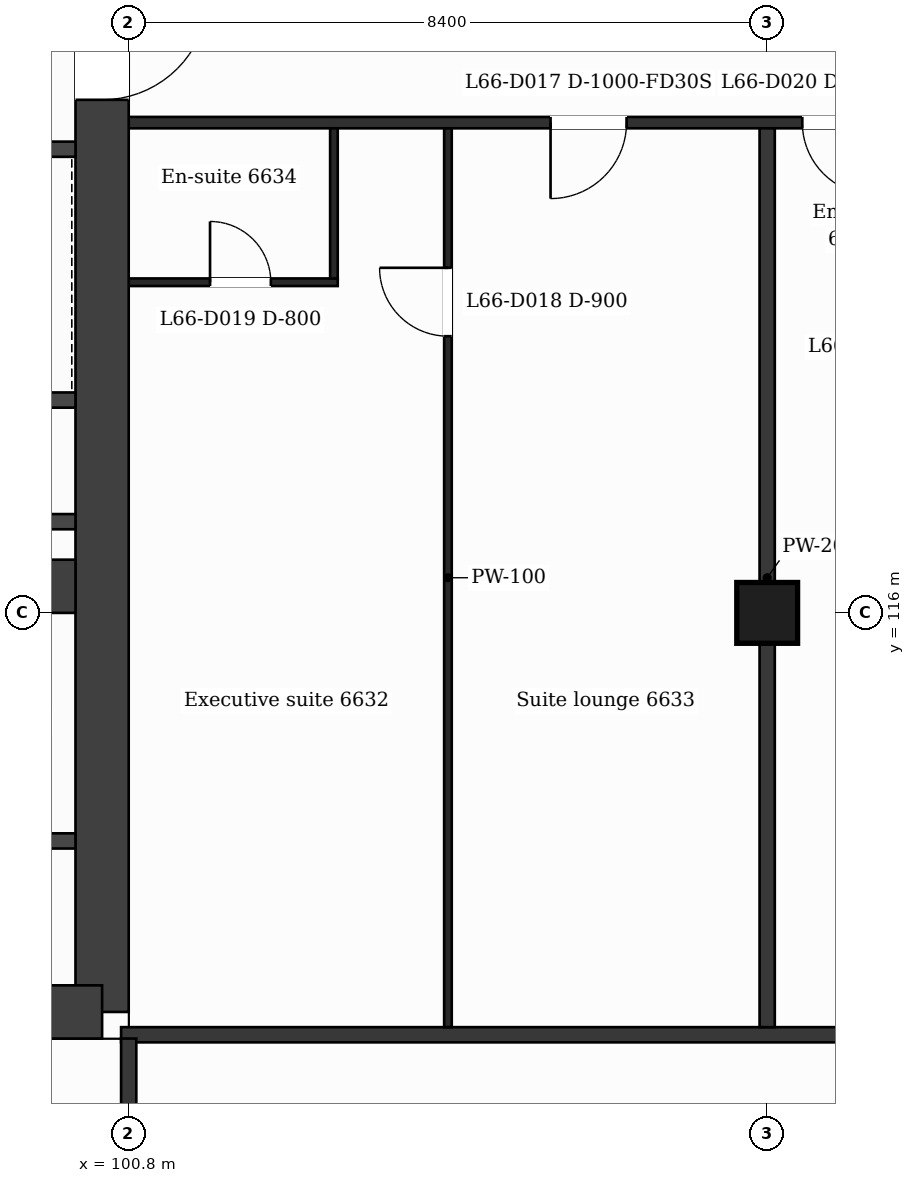
"""IFC4 building model, lengths in metres.
Left out: names, types, materials, properties, quantities, classifications, styles, units other than length and angle.
Written with IfcOpenShell. Run it as: python <this file> out.ifc"""

import sys

from ifc_helpers import new_model, si_unit, direction, frame, frame_2d, origin, origin_2d, place, context, subcontext, project, spatial, rectangle, extrude, element, fill, save


model = new_model("IFC4")
c1 = context("Model", 3, precision=1e-05, world=origin(), true_north=direction((0.0, 1.0)))
c2 = subcontext(c1, "Body", "Model", "MODEL_VIEW")
j1 = project(units=[si_unit("LENGTHUNIT", "METRE"), si_unit("PLANEANGLEUNIT", "RADIAN")], contexts=[c1])
p1 = place(None, origin())
s1 = spatial("IfcSite", under=j1, at=p1, CompositionType="ELEMENT")
p2 = place(p1, origin())
s2 = spatial("IfcBuilding", under=s1, at=p2, CompositionType="ELEMENT")
p3 = place(p2, frame((0.0, 0.0, 273.8)))
s3 = spatial("IfcBuildingStorey", under=s2, at=p3, CompositionType="ELEMENT", Elevation=273.8)
p4 = place(p3, frame((100.45, 132.05, 0.0), z_axis=(0.0, 0.0, 1.0), x_axis=(0.0, -1.0, 0.0)))
e1 = element("IfcWall", 1, at=p4, inside=s3, PredefinedType="SHEAR", context=c2, shape_type="SweptSolid", body=[
    extrude(rectangle(XDim=21.3, YDim=0.7, at=frame_2d((10.65, 0.0))), origin(), (0.0, 0.0, 1.0), 3.7),
])
p5 = place(p4, frame((7.9, 0.0, 0.0)))
e2 = element("IfcOpeningElement", 2, at=p5, cuts=e1, PredefinedType="OPENING", context=c2, shape_type="SweptSolid", body=[
    extrude(rectangle(XDim=1.4, YDim=2.1, at=frame_2d((0.7, 1.05))), frame((0.0, 0.36, 0.0), z_axis=(0.0, -1.0, 0.0), x_axis=(1.0, 0.0, 0.0)), (0.0, 0.0, 1.0), 0.72),
])
p6 = place(p3, frame((100.45, 110.75, 0.0), z_axis=(0.0, 0.0, 1.0), x_axis=(-1.0, 0.0, 0.0)))
e3 = element("IfcWall", 3, at=p6, inside=s3, PredefinedType="SHEAR", context=c2, shape_type="SweptSolid", body=[
    extrude(rectangle(XDim=14.38, YDim=0.7, at=frame_2d((7.19, 0.0))), origin(), (0.0, 0.0, 1.0), 3.7),
])
p7 = place(p6, frame((6.06, 0.0, 0.0)))
e4 = element("IfcOpeningElement", 4, at=p7, cuts=e3, PredefinedType="OPENING", context=c2, shape_type="SweptSolid", body=[
    extrude(rectangle(XDim=1.2, YDim=2.1, at=frame_2d((0.6, 1.05))), frame((0.0, 0.36, 0.0), z_axis=(0.0, -1.0, 0.0), x_axis=(1.0, 0.0, 0.0)), (0.0, 0.0, 1.0), 0.72),
])
p8 = place(p3, frame((94.6, 116.35, 0.0), z_axis=(0.0, 0.0, 1.0), x_axis=(1.0, 0.0, 0.0)))
e5 = element("IfcWall", 5, at=p8, inside=s3, PredefinedType="SHEAR", context=c2, shape_type="SweptSolid", body=[
    extrude(rectangle(XDim=5.5, YDim=0.7, at=frame_2d((2.75, 0.0))), origin(), (0.0, 0.0, 1.0), 3.7),
])
p9 = place(p3, frame((109.2, 116.0, 0.0), z_axis=(0.0, 0.0, 1.0), x_axis=(1.0, 0.0, 0.0)))
e6 = element("IfcColumn", 6, at=p9, inside=s3, PredefinedType="COLUMN", context=c2, shape_type="SweptSolid", body=[
    extrude(rectangle(XDim=0.8, YDim=0.8, at=origin_2d()), origin(), (0.0, 0.0, 1.0), 3.7),
])
p10 = place(p3, frame((100.7, 110.45, 0.0), z_axis=(0.0, 0.0, 1.0), x_axis=(1.0, 0.0, 0.0)))
e7 = element("IfcWall", 7, at=p10, inside=s3, PredefinedType="PARTITIONING", context=c2, shape_type="SweptSolid", body=[
    extrude(rectangle(XDim=25.4, YDim=0.2, at=frame_2d((12.7, 0.0))), origin(), (0.0, 0.0, 1.0), 3.38),
])
p11 = place(p3, frame((95.127, 113.0, 0.0), z_axis=(0.0, 0.0, 1.0), x_axis=(1.0, 0.0, 0.0)))
e8 = element("IfcWall", 8, at=p11, inside=s3, PredefinedType="PARTITIONING", context=c2, shape_type="SweptSolid", body=[
    extrude(rectangle(XDim=4.973, YDim=0.2, at=frame_2d((2.487, 0.0))), origin(), (0.0, 0.0, 1.0), 3.38),
])
p12 = place(p11, frame((3.096, 0.0, 0.0)))
e9 = element("IfcOpeningElement", 9, at=p12, cuts=e8, PredefinedType="OPENING", context=c2, shape_type="SweptSolid", body=[
    extrude(rectangle(XDim=0.9, YDim=2.1, at=frame_2d((0.45, 1.05))), frame((0.0, 0.11, 0.0), z_axis=(0.0, -1.0, 0.0), x_axis=(1.0, 0.0, 0.0)), (0.0, 0.0, 1.0), 0.22),
])
for number, where, z_axis, x_axis in (
    (10, (95.227, 117.2, 0.0), (0.0, 0.0, 1.0), (1.0, 0.0, 0.0)),
    (11, (95.227, 118.8, 0.0), (0.0, 0.0, 1.0), (1.0, 0.0, 0.0)),
):
    element("IfcWall", number, at=place(p3, frame(where, z_axis=z_axis, x_axis=x_axis)), inside=s3, PredefinedType="PARTITIONING", context=c2, shape_type="SweptSolid", body=[
        extrude(rectangle(XDim=4.873, YDim=0.2, at=frame_2d((2.437, 0.0))), origin(), (0.0, 0.0, 1.0), 3.38),
    ])
p13 = place(p3, frame((100.8, 120.35, 0.0), z_axis=(0.0, 0.0, 1.0), x_axis=(1.0, 0.0, 0.0)))
e12 = element("IfcWall", 12, at=p13, inside=s3, PredefinedType="PARTITIONING", context=c2, shape_type="SweptSolid", body=[
    extrude(rectangle(XDim=2.75, YDim=0.1, at=frame_2d((1.375, 0.0))), origin(), (0.0, 0.0, 1.0), 3.38),
])
p14 = place(p13, frame((1.07, 0.0, 0.0)))
e13 = element("IfcOpeningElement", 13, at=p14, cuts=e12, PredefinedType="OPENING", context=c2, shape_type="SweptSolid", body=[
    extrude(rectangle(XDim=0.8, YDim=2.1, at=frame_2d((0.4, 1.05))), frame((0.0, 0.06, 0.0), z_axis=(0.0, -1.0, 0.0), x_axis=(1.0, 0.0, 0.0)), (0.0, 0.0, 1.0), 0.12),
])
p15 = place(p3, frame((95.227, 122.1, 0.0), z_axis=(0.0, 0.0, 1.0), x_axis=(1.0, 0.0, 0.0)))
e14 = element("IfcWall", 14, at=p15, inside=s3, PredefinedType="PARTITIONING", context=c2, shape_type="SweptSolid", body=[
    extrude(rectangle(XDim=4.873, YDim=0.2, at=frame_2d((2.437, 0.0))), origin(), (0.0, 0.0, 1.0), 3.38),
])
p16 = place(p15, frame((0.605, 0.0, 0.0)))
e15 = element("IfcOpeningElement", 15, at=p16, cuts=e14, PredefinedType="OPENING", context=c2, shape_type="SweptSolid", body=[
    extrude(rectangle(XDim=1.1, YDim=2.1, at=frame_2d((0.55, 1.05))), frame((0.0, 0.11, 0.0), z_axis=(0.0, -1.0, 0.0), x_axis=(1.0, 0.0, 0.0)), (0.0, 0.0, 1.0), 0.22),
])
p17 = place(p15, frame((2.946, 0.0, 0.0)))
e16 = element("IfcOpeningElement", 16, at=p17, cuts=e14, PredefinedType="OPENING", context=c2, shape_type="SweptSolid", body=[
    extrude(rectangle(XDim=1.1, YDim=2.1, at=frame_2d((0.55, 1.05))), frame((0.0, 0.11, 0.0), z_axis=(0.0, -1.0, 0.0), x_axis=(1.0, 0.0, 0.0)), (0.0, 0.0, 1.0), 0.22),
])
p18 = place(p3, frame((100.8, 122.45, 0.0), z_axis=(0.0, 0.0, 1.0), x_axis=(1.0, 0.0, 0.0)))
e17 = element("IfcWall", 17, at=p18, inside=s3, PredefinedType="PARTITIONING", context=c2, shape_type="SweptSolid", body=[
    extrude(rectangle(XDim=25.2, YDim=0.15, at=frame_2d((12.6, 0.0))), origin(), (0.0, 0.0, 1.0), 3.38),
])
p19 = place(p18, frame((5.55, 0.0, 0.0)))
e18 = element("IfcOpeningElement", 18, at=p19, cuts=e17, PredefinedType="OPENING", context=c2, shape_type="SweptSolid", body=[
    extrude(rectangle(XDim=1.0, YDim=2.1, at=frame_2d((0.5, 1.05))), frame((0.0, 0.085, 0.0), z_axis=(0.0, -1.0, 0.0), x_axis=(1.0, 0.0, 0.0)), (0.0, 0.0, 1.0), 0.17),
])
p20 = place(p18, frame((8.862, 0.0, 0.0)))
e19 = element("IfcOpeningElement", 19, at=p20, cuts=e17, PredefinedType="OPENING", context=c2, shape_type="SweptSolid", body=[
    extrude(rectangle(XDim=0.95, YDim=2.1, at=frame_2d((0.475, 1.05))), frame((0.0, 0.085, 0.0), z_axis=(0.0, -1.0, 0.0), x_axis=(1.0, 0.0, 0.0)), (0.0, 0.0, 1.0), 0.17),
])
p21 = place(p18, frame((15.2, 0.0, 0.0)))
e20 = element("IfcOpeningElement", 20, at=p21, cuts=e17, PredefinedType="OPENING", context=c2, shape_type="SweptSolid", body=[
    extrude(rectangle(XDim=0.95, YDim=2.1, at=frame_2d((0.475, 1.05))), frame((0.0, 0.085, 0.0), z_axis=(0.0, -1.0, 0.0), x_axis=(1.0, 0.0, 0.0)), (0.0, 0.0, 1.0), 0.17),
])
p22 = place(p18, frame((17.325, 0.0, 0.0)))
e21 = element("IfcOpeningElement", 21, at=p22, cuts=e17, PredefinedType="OPENING", context=c2, shape_type="SweptSolid", body=[
    extrude(rectangle(XDim=1.0, YDim=2.1, at=frame_2d((0.5, 1.05))), frame((0.0, 0.085, 0.0), z_axis=(0.0, -1.0, 0.0), x_axis=(1.0, 0.0, 0.0)), (0.0, 0.0, 1.0), 0.17),
])
p23 = place(p18, frame((23.862, 0.0, 0.0)))
e22 = element("IfcOpeningElement", 22, at=p23, cuts=e17, PredefinedType="OPENING", context=c2, shape_type="SweptSolid", body=[
    extrude(rectangle(XDim=0.95, YDim=2.1, at=frame_2d((0.475, 1.05))), frame((0.0, 0.085, 0.0), z_axis=(0.0, -1.0, 0.0), x_axis=(1.0, 0.0, 0.0)), (0.0, 0.0, 1.0), 0.17),
])
p24 = place(p3, frame((100.8, 108.79, 0.0), z_axis=(0.0, 0.0, 1.0), x_axis=(0.0, 1.0, 0.0)))
e23 = element("IfcWall", 23, at=p24, inside=s3, PredefinedType="PARTITIONING", context=c2, shape_type="SweptSolid", body=[
    extrude(rectangle(XDim=1.61, YDim=0.2, at=frame_2d((0.805, 0.0))), origin(), (0.0, 0.0, 1.0), 3.38),
])
p25 = place(p3, frame((103.5, 120.4, 0.0), z_axis=(0.0, 0.0, 1.0), x_axis=(0.0, 1.0, 0.0)))
e24 = element("IfcWall", 24, at=p25, inside=s3, PredefinedType="PARTITIONING", context=c2, shape_type="SweptSolid", body=[
    extrude(rectangle(XDim=1.975, YDim=0.1, at=frame_2d((0.988, 0.0))), origin(), (0.0, 0.0, 1.0), 3.38),
])
p26 = place(p3, frame((105.0, 110.55, 0.0), z_axis=(0.0, 0.0, 1.0), x_axis=(0.0, 1.0, 0.0)))
e25 = element("IfcWall", 25, at=p26, inside=s3, PredefinedType="PARTITIONING", context=c2, shape_type="SweptSolid", body=[
    extrude(rectangle(XDim=11.825, YDim=0.1, at=frame_2d((5.913, 0.0))), origin(), (0.0, 0.0, 1.0), 3.38),
])
p27 = place(p26, frame((9.09, 0.0, 0.0)))
e26 = element("IfcOpeningElement", 26, at=p27, cuts=e25, PredefinedType="OPENING", context=c2, shape_type="SweptSolid", body=[
    extrude(rectangle(XDim=0.9, YDim=2.1, at=frame_2d((0.45, 1.05))), frame((0.0, 0.06, 0.0), z_axis=(0.0, -1.0, 0.0), x_axis=(1.0, 0.0, 0.0)), (0.0, 0.0, 1.0), 0.12),
])
p28 = place(p3, frame((109.2, 110.55, 0.0), z_axis=(0.0, 0.0, 1.0), x_axis=(0.0, 1.0, 0.0)))
e27 = element("IfcWall", 27, at=p28, inside=s3, PredefinedType="PARTITIONING", context=c2, shape_type="SweptSolid", body=[
    extrude(rectangle(XDim=11.825, YDim=0.2, at=frame_2d((5.913, 0.0))), origin(), (0.0, 0.0, 1.0), 3.38),
])
p29 = place(p19, origin())
e28 = element("IfcDoor", 28, at=p29, inside=s3, OperationType="SINGLE_SWING_LEFT", PredefinedType="DOOR", context=c2, shape_type="SweptSolid", body=[
    extrude(rectangle(XDim=1.0, YDim=2.1, at=frame_2d((0.5, 1.05))), frame((0.0, 0.025, 0.0), z_axis=(0.0, -1.0, 0.0), x_axis=(1.0, 0.0, 0.0)), (0.0, 0.0, 1.0), 0.05),
])
fill(e18, e28)
p30 = place(p27, origin())
e29 = element("IfcDoor", 29, at=p30, inside=s3, OperationType="SINGLE_SWING_RIGHT", PredefinedType="DOOR", context=c2, shape_type="SweptSolid", body=[
    extrude(rectangle(XDim=0.9, YDim=2.1, at=frame_2d((0.45, 1.05))), frame((0.0, 0.025, 0.0), z_axis=(0.0, -1.0, 0.0), x_axis=(1.0, 0.0, 0.0)), (0.0, 0.0, 1.0), 0.05),
])
fill(e26, e29)
p31 = place(p14, origin())
e30 = element("IfcDoor", 30, at=p31, inside=s3, OperationType="SINGLE_SWING_LEFT", PredefinedType="DOOR", context=c2, shape_type="SweptSolid", body=[
    extrude(rectangle(XDim=0.8, YDim=2.1, at=frame_2d((0.4, 1.05))), frame((0.0, 0.025, 0.0), z_axis=(0.0, -1.0, 0.0), x_axis=(1.0, 0.0, 0.0)), (0.0, 0.0, 1.0), 0.05),
])
fill(e13, e30)
p32 = place(p20, origin())
e31 = element("IfcDoor", 31, at=p32, inside=s3, OperationType="SINGLE_SWING_RIGHT", PredefinedType="DOOR", context=c2, shape_type="SweptSolid", body=[
    extrude(rectangle(XDim=0.95, YDim=2.1, at=frame_2d((0.475, 1.05))), frame((0.0, 0.025, 0.0), z_axis=(0.0, -1.0, 0.0), x_axis=(1.0, 0.0, 0.0)), (0.0, 0.0, 1.0), 0.05),
])
fill(e19, e31)
p33 = place(p5, origin())
e32 = element("IfcDoor", 32, at=p33, inside=s3, OperationType="SINGLE_SWING_LEFT", PredefinedType="DOOR", context=c2, shape_type="SweptSolid", body=[
    extrude(rectangle(XDim=1.4, YDim=2.1, at=frame_2d((0.7, 1.05))), frame((0.0, 0.025, 0.0), z_axis=(0.0, -1.0, 0.0), x_axis=(1.0, 0.0, 0.0)), (0.0, 0.0, 1.0), 0.05),
])
fill(e2, e32)
save(model, sys.argv[1])
